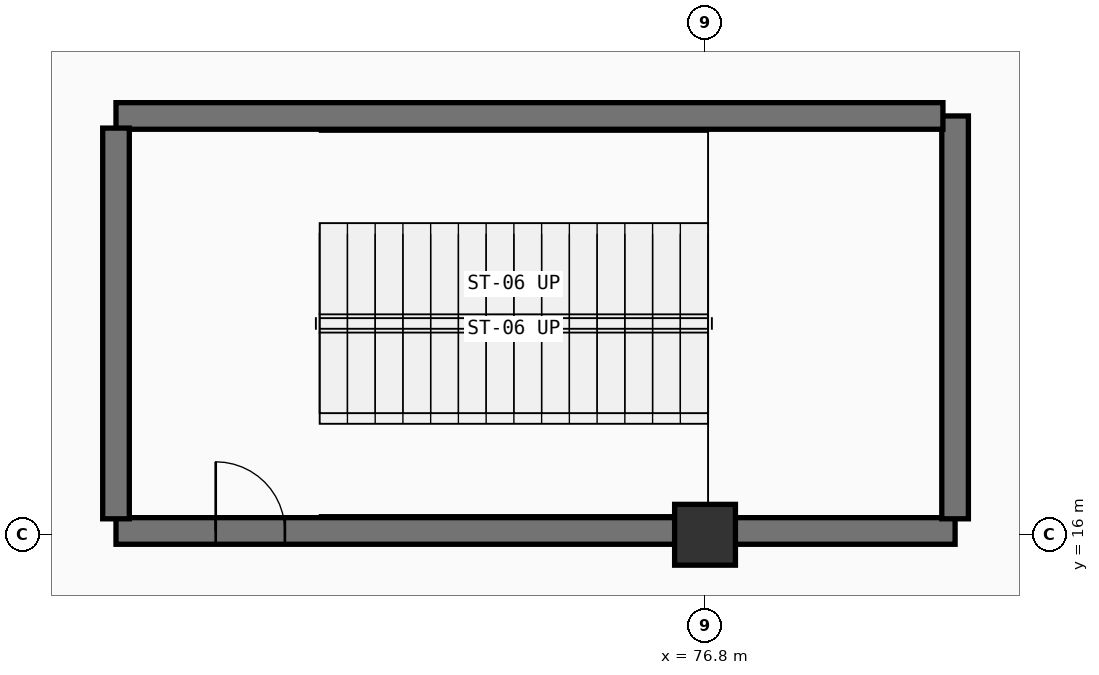
"""IFC4 building model, lengths in metres.
Left out: names, types, materials, properties, quantities, classifications, styles, units other than length and angle.
Written with IfcOpenShell. Run it as: python <this file> out.ifc"""

import sys

from ifc_helpers import new_model, si_unit, direction, frame, frame_2d, origin, origin_2d, place, context, subcontext, project, spatial, rectangle, circle, extrude, element, fill, save


model = new_model("IFC4")
c1 = context("Model", 3, precision=1e-05, world=origin(), true_north=direction((0.0, 1.0)))
c2 = subcontext(c1, "Body", "Model", "MODEL_VIEW")
j1 = project(units=[si_unit("LENGTHUNIT", "METRE"), si_unit("PLANEANGLEUNIT", "RADIAN")], contexts=[c1])
p1 = place(None, origin())
s1 = spatial("IfcSite", under=j1, at=p1, CompositionType="ELEMENT")
p2 = place(p1, origin())
s2 = spatial("IfcBuilding", under=s1, at=p2, CompositionType="ELEMENT")
p3 = place(p2, frame((0.0, 0.0, -5.4)))
s3 = spatial("IfcBuildingStorey", under=s2, at=p3, CompositionType="ELEMENT", Elevation=-5.4)
p4 = place(p3, frame((76.8, 16.0, 0.0), z_axis=(0.0, 0.0, 1.0), x_axis=(1.0, 0.0, 0.0)))
e1 = element("IfcColumn", 1, at=p4, inside=s3, PredefinedType="COLUMN", context=c2, shape_type="SweptSolid", body=[
    extrude(circle(Radius=0.4, at=origin_2d()), origin(), (0.0, 0.0, 1.0), 5.4),
])
p5 = place(p3, frame((69.05, 16.05, 0.0), z_axis=(0.0, 0.0, 1.0), x_axis=(1.0, 0.0, 0.0)))
e2 = element("IfcWall", 2, at=p5, inside=s3, PredefinedType="SHEAR", context=c2, shape_type="SweptSolid", body=[
    extrude(rectangle(XDim=11.04, YDim=0.35, at=frame_2d((5.52, 0.0))), origin(), (0.0, 0.0, 1.0), 5.09),
])
p6 = place(p5, frame((1.312, 0.0, 0.0)))
e3 = element("IfcOpeningElement", 3, at=p6, cuts=e2, PredefinedType="OPENING", context=c2, shape_type="SweptSolid", body=[
    extrude(rectangle(XDim=0.91, YDim=2.08, at=frame_2d((0.455, 1.04))), frame((0.0, 0.185, 0.0), z_axis=(0.0, -1.0, 0.0), x_axis=(1.0, 0.0, 0.0)), (0.0, 0.0, 1.0), 0.37),
])
p7 = place(p3, frame((80.09, 16.21, 0.0), z_axis=(0.0, 0.0, 1.0), x_axis=(0.0, 1.0, 0.0)))
e4 = element("IfcWall", 4, at=p7, inside=s3, PredefinedType="SHEAR", context=c2, shape_type="SweptSolid", body=[
    extrude(rectangle(XDim=5.3, YDim=0.35, at=frame_2d((2.65, 0.0))), origin(), (0.0, 0.0, 1.0), 5.09),
])
p8 = place(p3, frame((79.93, 21.51, 0.0), z_axis=(0.0, 0.0, 1.0), x_axis=(-1.0, 0.0, 0.0)))
e5 = element("IfcWall", 5, at=p8, inside=s3, PredefinedType="SHEAR", context=c2, shape_type="SweptSolid", body=[
    extrude(rectangle(XDim=10.88, YDim=0.35, at=frame_2d((5.44, 0.0))), origin(), (0.0, 0.0, 1.0), 5.09),
])
p9 = place(p3, frame((69.05, 21.35, 0.0), z_axis=(0.0, 0.0, 1.0), x_axis=(0.0, -1.0, 0.0)))
e6 = element("IfcWall", 6, at=p9, inside=s3, PredefinedType="SHEAR", context=c2, shape_type="SweptSolid", body=[
    extrude(rectangle(XDim=5.14, YDim=0.35, at=frame_2d((2.57, 0.0))), origin(), (0.0, 0.0, 1.0), 5.09),
])
p10 = place(p6, origin())
e7 = element("IfcDoor", 7, at=p10, inside=s3, OperationType="SINGLE_SWING_RIGHT", PredefinedType="DOOR", context=c2, shape_type="SweptSolid", body=[
    extrude(rectangle(XDim=0.91, YDim=2.08, at=frame_2d((0.455, 1.04))), frame((0.0, 0.025, 0.0), z_axis=(0.0, -1.0, 0.0), x_axis=(1.0, 0.0, 0.0)), (0.0, 0.0, 1.0), 0.05),
])
fill(e3, e7)
save(model, sys.argv[1])
